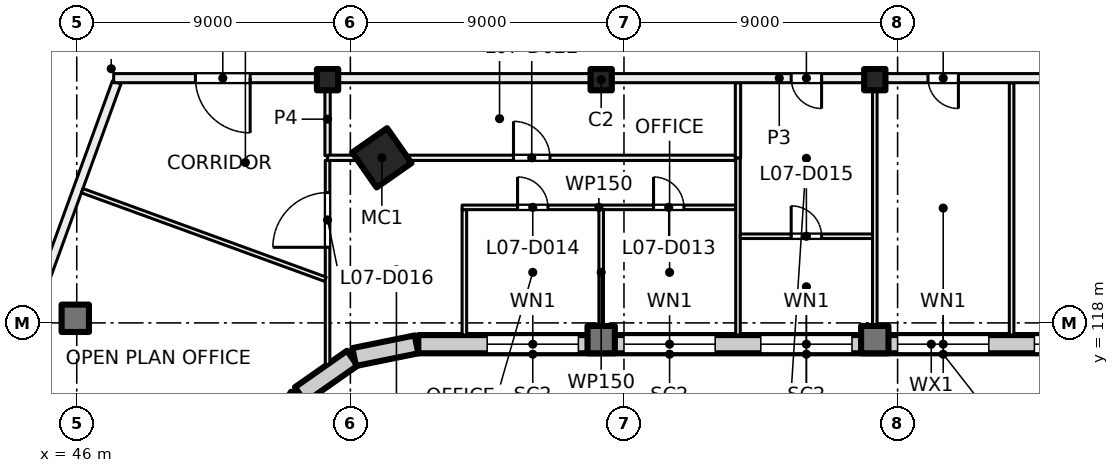
"""IFC4 building model, lengths in metres.
Left out: names, types, materials, properties, quantities, classifications, styles, units other than length and angle.
Written with IfcOpenShell. Run it as: python <this file> out.ifc"""

import sys

from ifc_helpers import new_model, si_unit, direction, frame, frame_2d, origin, origin_2d, place, context, subcontext, project, spatial, rectangle, hollow_rectangle, extrude, element, fill, save


model = new_model("IFC4")
c1 = context("Model", 3, precision=1e-05, world=origin(), true_north=direction((0.0, 1.0)))
c2 = subcontext(c1, "Body", "Model", "MODEL_VIEW")
j1 = project(units=[si_unit("LENGTHUNIT", "METRE"), si_unit("PLANEANGLEUNIT", "RADIAN")], contexts=[c1])
p1 = place(None, origin())
s1 = spatial("IfcSite", under=j1, at=p1, CompositionType="ELEMENT")
p2 = place(p1, origin())
s2 = spatial("IfcBuilding", under=s1, at=p2, CompositionType="ELEMENT")
p3 = place(p2, frame((0.0, 0.0, 35.5)))
s3 = spatial("IfcBuildingStorey", under=s2, at=p3, CompositionType="ELEMENT", Elevation=35.5)
p4 = place(p3, frame((56.036, 123.43, 0.0), z_axis=(0.0, 0.0, 1.0), x_axis=(0.573576436351, -0.819152044289, 0.0)))
e1 = element("IfcColumn", 1, at=p4, inside=s3, PredefinedType="COLUMN", context=c2, shape_type="SweptSolid", body=[
    extrude(hollow_rectangle(XDim=1.4, YDim=1.4, WallThickness=0.04, at=origin_2d()), origin(), (0.0, 0.0, 1.0), 4.0),
])
for number, where, z_axis, x_axis in (
    (2, (54.25, 126.0, 0.0), (0.0, 0.0, 1.0), (1.0, 0.0, 0.0)),
    (3, (63.25, 126.0, 0.0), (0.0, 0.0, 1.0), (1.0, 0.0, 0.0)),
    (4, (72.25, 126.0, 0.0), (0.0, 0.0, 1.0), (1.0, 0.0, 0.0)),
):
    element("IfcColumn", number, at=place(p3, frame(where, z_axis=z_axis, x_axis=x_axis)), inside=s3, PredefinedType="COLUMN", context=c2, shape_type="SweptSolid", body=[
        extrude(rectangle(XDim=0.7, YDim=0.7, at=origin_2d()), origin(), (0.0, 0.0, 1.0), 4.0),
    ])
for number, where, z_axis, x_axis in (
    (5, (45.952, 118.152, 0.0), (0.0, 0.0, 1.0), (1.0, 0.0, 0.0)),
    (6, (63.25, 117.45, 0.0), (0.0, 0.0, 1.0), (1.0, 0.0, 0.0)),
    (7, (72.25, 117.45, 0.0), (0.0, 0.0, 1.0), (1.0, 0.0, 0.0)),
):
    element("IfcColumn", number, at=place(p3, frame(where, z_axis=z_axis, x_axis=x_axis)), inside=s3, PredefinedType="COLUMN", context=c2, shape_type="SweptSolid", body=[
        extrude(rectangle(XDim=0.9, YDim=0.9, at=origin_2d()), origin(), (0.0, 0.0, 1.0), 4.0),
    ])
p5 = place(p3, frame((53.305, 115.578, 0.0), z_axis=(0.0, 0.0, 1.0), x_axis=(-0.522402266438, -0.852699168535, 0.0)))
e8 = element("IfcWall", 8, at=p5, inside=s3, PredefinedType="SOLIDWALL", context=c2, shape_type="SweptSolid", body=[
    extrude(rectangle(XDim=2.042, YDim=0.6, at=frame_2d((1.021, 0.0))), origin(), (0.0, 0.0, 1.0), 3.625),
])
for number, where, z_axis, x_axis in (
    (9, (55.062, 116.839, 0.0), (0.0, 0.0, 1.0), (-0.819, -0.574, 0.0)),
    (10, (57.175, 117.294, 0.0), (0.0, 0.0, 1.0), (-0.98, -0.199, 0.0)),
):
    element("IfcWall", number, at=place(p3, frame(where, z_axis=z_axis, x_axis=x_axis)), inside=s3, PredefinedType="SOLIDWALL", context=c2, shape_type="SweptSolid", body=[
        extrude(rectangle(XDim=2.092, YDim=0.6, at=frame_2d((1.046, 0.0))), origin(), (0.0, 0.0, 1.0), 3.625),
    ])
p6 = place(p3, frame((90.98, 117.3, 0.0), z_axis=(0.0, 0.0, 1.0), x_axis=(-1.0, 0.0, 0.0)))
e11 = element("IfcWall", 11, at=p6, inside=s3, PredefinedType="SOLIDWALL", context=c2, shape_type="SweptSolid", body=[
    extrude(rectangle(XDim=33.745, YDim=0.6, at=frame_2d((16.873, 0.0))), origin(), (0.0, 0.0, 1.0), 3.625),
])
p7 = place(p6, frame((1.48, 0.0, 0.9)))
e12 = element("IfcOpeningElement", 12, at=p7, cuts=e11, PredefinedType="OPENING", context=c2, shape_type="SweptSolid", body=[
    extrude(rectangle(XDim=3.0, YDim=2.4, at=frame_2d((1.5, 1.2))), frame((0.0, 0.31, 0.0), z_axis=(0.0, -1.0, 0.0), x_axis=(1.0, 0.0, 0.0)), (0.0, 0.0, 1.0), 0.62),
])
p8 = place(p6, frame((5.98, 0.0, 0.9)))
e13 = element("IfcOpeningElement", 13, at=p8, cuts=e11, PredefinedType="OPENING", context=c2, shape_type="SweptSolid", body=[
    extrude(rectangle(XDim=3.0, YDim=2.4, at=frame_2d((1.5, 1.2))), frame((0.0, 0.31, 0.0), z_axis=(0.0, -1.0, 0.0), x_axis=(1.0, 0.0, 0.0)), (0.0, 0.0, 1.0), 0.62),
])
p9 = place(p6, frame((10.48, 0.0, 0.9)))
e14 = element("IfcOpeningElement", 14, at=p9, cuts=e11, PredefinedType="OPENING", context=c2, shape_type="SweptSolid", body=[
    extrude(rectangle(XDim=3.0, YDim=2.4, at=frame_2d((1.5, 1.2))), frame((0.0, 0.31, 0.0), z_axis=(0.0, -1.0, 0.0), x_axis=(1.0, 0.0, 0.0)), (0.0, 0.0, 1.0), 0.62),
])
p10 = place(p6, frame((14.98, 0.0, 0.9)))
e15 = element("IfcOpeningElement", 15, at=p10, cuts=e11, PredefinedType="OPENING", context=c2, shape_type="SweptSolid", body=[
    extrude(rectangle(XDim=3.0, YDim=2.4, at=frame_2d((1.5, 1.2))), frame((0.0, 0.31, 0.0), z_axis=(0.0, -1.0, 0.0), x_axis=(1.0, 0.0, 0.0)), (0.0, 0.0, 1.0), 0.62),
])
p11 = place(p6, frame((19.48, 0.0, 0.9)))
e16 = element("IfcOpeningElement", 16, at=p11, cuts=e11, PredefinedType="OPENING", context=c2, shape_type="SweptSolid", body=[
    extrude(rectangle(XDim=3.0, YDim=2.4, at=frame_2d((1.5, 1.2))), frame((0.0, 0.31, 0.0), z_axis=(0.0, -1.0, 0.0), x_axis=(1.0, 0.0, 0.0)), (0.0, 0.0, 1.0), 0.62),
])
p12 = place(p6, frame((23.98, 0.0, 0.9)))
e17 = element("IfcOpeningElement", 17, at=p12, cuts=e11, PredefinedType="OPENING", context=c2, shape_type="SweptSolid", body=[
    extrude(rectangle(XDim=3.0, YDim=2.4, at=frame_2d((1.5, 1.2))), frame((0.0, 0.31, 0.0), z_axis=(0.0, -1.0, 0.0), x_axis=(1.0, 0.0, 0.0)), (0.0, 0.0, 1.0), 0.62),
])
p13 = place(p6, frame((28.48, 0.0, 0.9)))
e18 = element("IfcOpeningElement", 18, at=p13, cuts=e11, PredefinedType="OPENING", context=c2, shape_type="SweptSolid", body=[
    extrude(rectangle(XDim=3.0, YDim=2.4, at=frame_2d((1.5, 1.2))), frame((0.0, 0.31, 0.0), z_axis=(0.0, -1.0, 0.0), x_axis=(1.0, 0.0, 0.0)), (0.0, 0.0, 1.0), 0.62),
])
p14 = place(p3, frame((47.314, 125.909, 0.0), z_axis=(0.0, 0.0, 1.0), x_axis=(-0.342010770371, -0.939696032209, 0.0)))
e19 = element("IfcWall", 19, at=p14, inside=s3, PredefinedType="PARTITIONING", context=c2, shape_type="SweptSolid", body=[
    extrude(rectangle(XDim=31.485, YDim=0.3, at=frame_2d((15.742, 0.0))), origin(), (0.0, 0.0, 1.0), 3.625),
])
p15 = place(p14, frame((16.709, 0.0, 0.0)))
e20 = element("IfcOpeningElement", 20, at=p15, cuts=e19, PredefinedType="OPENING", context=c2, shape_type="SweptSolid", body=[
    extrude(rectangle(XDim=1.8, YDim=2.1, at=frame_2d((0.9, 1.05))), frame((0.0, 0.16, 0.0), z_axis=(0.0, -1.0, 0.0), x_axis=(1.0, 0.0, 0.0)), (0.0, 0.0, 1.0), 0.32),
])
p16 = place(p3, frame((54.25, 116.637, 0.0), z_axis=(0.0, 0.0, 1.0), x_axis=(0.0, 1.0, 0.0)))
e21 = element("IfcWall", 21, at=p16, inside=s3, PredefinedType="PARTITIONING", context=c2, shape_type="SweptSolid", body=[
    extrude(rectangle(XDim=6.709, YDim=0.15, at=frame_2d((3.354, 0.0))), origin(), (0.0, 0.0, 1.0), 3.625),
])
p17 = place(p16, frame((3.85, 0.0, 0.0)))
e22 = element("IfcOpeningElement", 22, at=p17, cuts=e21, PredefinedType="OPENING", context=c2, shape_type="SweptSolid", body=[
    extrude(rectangle(XDim=1.8, YDim=2.1, at=frame_2d((0.9, 1.05))), frame((0.0, 0.085, 0.0), z_axis=(0.0, -1.0, 0.0), x_axis=(1.0, 0.0, 0.0)), (0.0, 0.0, 1.0), 0.17),
])
p18 = place(p3, frame((54.18, 119.436, 0.0), z_axis=(0.0, 0.0, 1.0), x_axis=(-0.939669476286, 0.342083725624, 0.0)))
e23 = element("IfcWall", 23, at=p18, inside=s3, PredefinedType="PARTITIONING", context=c2, shape_type="SweptSolid", body=[
    extrude(rectangle(XDim=8.516, YDim=0.15, at=frame_2d((4.258, 0.0))), origin(), (0.0, 0.0, 1.0), 3.625),
])
p19 = place(p3, frame((54.25, 123.502, 0.0), z_axis=(0.0, 0.0, 1.0), x_axis=(0.0, 1.0, 0.0)))
e24 = element("IfcWall", 24, at=p19, inside=s3, PredefinedType="PARTITIONING", context=c2, shape_type="SweptSolid", body=[
    extrude(rectangle(XDim=2.398, YDim=0.175, at=frame_2d((1.199, 0.0))), origin(), (0.0, 0.0, 1.0), 3.625),
])
p20 = place(p3, frame((54.25, 123.43, 0.0), z_axis=(0.0, 0.0, 1.0), x_axis=(1.0, 0.0, 0.0)))
e25 = element("IfcWall", 25, at=p20, inside=s3, PredefinedType="PARTITIONING", context=c2, shape_type="SweptSolid", body=[
    extrude(rectangle(XDim=13.412, YDim=0.175, at=frame_2d((6.706, 0.0))), origin(), (0.0, 0.0, 1.0), 3.625),
])
p21 = place(p20, frame((6.116, 0.0, 0.0)))
e26 = element("IfcOpeningElement", 26, at=p21, cuts=e25, PredefinedType="OPENING", context=c2, shape_type="SweptSolid", body=[
    extrude(rectangle(XDim=1.2, YDim=2.1, at=frame_2d((0.6, 1.05))), frame((0.0, 0.097, 0.0), z_axis=(0.0, -1.0, 0.0), x_axis=(1.0, 0.0, 0.0)), (0.0, 0.0, 1.0), 0.195),
])
p22 = place(p3, frame((58.75, 117.6, 0.0), z_axis=(0.0, 0.0, 1.0), x_axis=(0.0, 1.0, 0.0)))
e27 = element("IfcWall", 27, at=p22, inside=s3, PredefinedType="PARTITIONING", context=c2, shape_type="SweptSolid", body=[
    extrude(rectangle(XDim=4.125, YDim=0.15, at=frame_2d((2.062, 0.0))), origin(), (0.0, 0.0, 1.0), 3.625),
])
p23 = place(p3, frame((58.675, 121.8, 0.0), z_axis=(0.0, 0.0, 1.0), x_axis=(1.0, 0.0, 0.0)))
e28 = element("IfcWall", 28, at=p23, inside=s3, PredefinedType="PARTITIONING", context=c2, shape_type="SweptSolid", body=[
    extrude(rectangle(XDim=9.0, YDim=0.15, at=frame_2d((4.5, 0.0))), origin(), (0.0, 0.0, 1.0), 3.625),
])
p24 = place(p23, frame((6.298, 0.0, 0.0)))
e29 = element("IfcOpeningElement", 29, at=p24, cuts=e28, PredefinedType="OPENING", context=c2, shape_type="SweptSolid", body=[
    extrude(rectangle(XDim=1.0, YDim=2.1, at=frame_2d((0.5, 1.05))), frame((0.0, 0.085, 0.0), z_axis=(0.0, -1.0, 0.0), x_axis=(1.0, 0.0, 0.0)), (0.0, 0.0, 1.0), 0.17),
])
p25 = place(p23, frame((1.825, 0.0, 0.0)))
e30 = element("IfcOpeningElement", 30, at=p25, cuts=e28, PredefinedType="OPENING", context=c2, shape_type="SweptSolid", body=[
    extrude(rectangle(XDim=1.0, YDim=2.1, at=frame_2d((0.5, 1.05))), frame((0.0, 0.085, 0.0), z_axis=(0.0, -1.0, 0.0), x_axis=(1.0, 0.0, 0.0)), (0.0, 0.0, 1.0), 0.17),
])
p26 = place(p3, frame((63.25, 117.6, 0.0), z_axis=(0.0, 0.0, 1.0), x_axis=(0.0, 1.0, 0.0)))
e31 = element("IfcWall", 31, at=p26, inside=s3, PredefinedType="PARTITIONING", context=c2, shape_type="SweptSolid", body=[
    extrude(rectangle(XDim=4.125, YDim=0.15, at=frame_2d((2.062, 0.0))), origin(), (0.0, 0.0, 1.0), 3.625),
])
p27 = place(p3, frame((67.75, 117.6, 0.0), z_axis=(0.0, 0.0, 1.0), x_axis=(0.0, 1.0, 0.0)))
e32 = element("IfcWall", 32, at=p27, inside=s3, PredefinedType="PARTITIONING", context=c2, shape_type="SweptSolid", body=[
    extrude(rectangle(XDim=5.83, YDim=0.15, at=frame_2d((2.915, 0.0))), origin(), (0.0, 0.0, 1.0), 3.625),
])
p28 = place(p3, frame((67.825, 120.85, 0.0), z_axis=(0.0, 0.0, 1.0), x_axis=(1.0, 0.0, 0.0)))
e33 = element("IfcWall", 33, at=p28, inside=s3, PredefinedType="PARTITIONING", context=c2, shape_type="SweptSolid", body=[
    extrude(rectangle(XDim=4.35, YDim=0.15, at=frame_2d((2.175, 0.0))), origin(), (0.0, 0.0, 1.0), 3.625),
])
p29 = place(p28, frame((1.675, 0.0, 0.0)))
e34 = element("IfcOpeningElement", 34, at=p29, cuts=e33, PredefinedType="OPENING", context=c2, shape_type="SweptSolid", body=[
    extrude(rectangle(XDim=1.0, YDim=2.1, at=frame_2d((0.5, 1.05))), frame((0.0, 0.085, 0.0), z_axis=(0.0, -1.0, 0.0), x_axis=(1.0, 0.0, 0.0)), (0.0, 0.0, 1.0), 0.17),
])
p30 = place(p3, frame((67.75, 123.43, 0.0), z_axis=(0.0, 0.0, 1.0), x_axis=(0.0, 1.0, 0.0)))
e35 = element("IfcWall", 35, at=p30, inside=s3, PredefinedType="PARTITIONING", context=c2, shape_type="SweptSolid", body=[
    extrude(rectangle(XDim=2.47, YDim=0.175, at=frame_2d((1.235, 0.0))), origin(), (0.0, 0.0, 1.0), 3.625),
])
for number, where, z_axis, x_axis in (
    (36, (72.25, 117.6, 0.0), (0.0, 0.0, 1.0), (0.0, 1.0, 0.0)),
    (37, (76.75, 117.6, 0.0), (0.0, 0.0, 1.0), (0.0, 1.0, 0.0)),
):
    element("IfcWall", number, at=place(p3, frame(where, z_axis=z_axis, x_axis=x_axis)), inside=s3, PredefinedType="PARTITIONING", context=c2, shape_type="SweptSolid", body=[
        extrude(rectangle(XDim=8.3, YDim=0.15, at=frame_2d((4.15, 0.0))), origin(), (0.0, 0.0, 1.0), 3.625),
    ])
p31 = place(p3, frame((91.0, 126.05, 0.0), z_axis=(0.0, 0.0, 1.0), x_axis=(-1.0, 0.0, 0.0)))
e38 = element("IfcWall", 38, at=p31, inside=s3, PredefinedType="PARTITIONING", context=c2, shape_type="SweptSolid", body=[
    extrude(rectangle(XDim=43.785, YDim=0.3, at=frame_2d((21.893, 0.0))), origin(), (0.0, 0.0, 1.0), 3.625),
])
p32 = place(p31, frame((2.025, 0.0, 0.0)))
e39 = element("IfcOpeningElement", 39, at=p32, cuts=e38, PredefinedType="OPENING", context=c2, shape_type="SweptSolid", body=[
    extrude(rectangle(XDim=1.2, YDim=2.1, at=frame_2d((0.6, 1.05))), frame((0.0, 0.16, 0.0), z_axis=(0.0, -1.0, 0.0), x_axis=(1.0, 0.0, 0.0)), (0.0, 0.0, 1.0), 0.32),
])
p33 = place(p31, frame((7.0, 0.0, 0.0)))
e40 = element("IfcOpeningElement", 40, at=p33, cuts=e38, PredefinedType="OPENING", context=c2, shape_type="SweptSolid", body=[
    extrude(rectangle(XDim=1.0, YDim=2.1, at=frame_2d((0.5, 1.05))), frame((0.0, 0.16, 0.0), z_axis=(0.0, -1.0, 0.0), x_axis=(1.0, 0.0, 0.0)), (0.0, 0.0, 1.0), 0.32),
])
p34 = place(p31, frame((11.5, 0.0, 0.0)))
e41 = element("IfcOpeningElement", 41, at=p34, cuts=e38, PredefinedType="OPENING", context=c2, shape_type="SweptSolid", body=[
    extrude(rectangle(XDim=1.0, YDim=2.1, at=frame_2d((0.5, 1.05))), frame((0.0, 0.16, 0.0), z_axis=(0.0, -1.0, 0.0), x_axis=(1.0, 0.0, 0.0)), (0.0, 0.0, 1.0), 0.32),
])
p35 = place(p31, frame((16.0, 0.0, 0.0)))
e42 = element("IfcOpeningElement", 42, at=p35, cuts=e38, PredefinedType="OPENING", context=c2, shape_type="SweptSolid", body=[
    extrude(rectangle(XDim=1.0, YDim=2.1, at=frame_2d((0.5, 1.05))), frame((0.0, 0.16, 0.0), z_axis=(0.0, -1.0, 0.0), x_axis=(1.0, 0.0, 0.0)), (0.0, 0.0, 1.0), 0.32),
])
p36 = place(p31, frame((20.5, 0.0, 0.0)))
e43 = element("IfcOpeningElement", 43, at=p36, cuts=e38, PredefinedType="OPENING", context=c2, shape_type="SweptSolid", body=[
    extrude(rectangle(XDim=1.0, YDim=2.1, at=frame_2d((0.5, 1.05))), frame((0.0, 0.16, 0.0), z_axis=(0.0, -1.0, 0.0), x_axis=(1.0, 0.0, 0.0)), (0.0, 0.0, 1.0), 0.32),
])
p37 = place(p31, frame((39.296, 0.0, 0.0)))
e44 = element("IfcOpeningElement", 44, at=p37, cuts=e38, PredefinedType="OPENING", context=c2, shape_type="SweptSolid", body=[
    extrude(rectangle(XDim=1.8, YDim=2.1, at=frame_2d((0.9, 1.05))), frame((0.0, 0.16, 0.0), z_axis=(0.0, -1.0, 0.0), x_axis=(1.0, 0.0, 0.0)), (0.0, 0.0, 1.0), 0.32),
])
p38 = place(p9, origin())
e45 = element("IfcWindow", 45, at=p38, inside=s3, PartitioningType="SINGLE_PANEL", PredefinedType="WINDOW", context=c2, shape_type="SweptSolid", body=[
    extrude(rectangle(XDim=3.0, YDim=2.4, at=frame_2d((1.5, 1.2))), frame((0.0, 0.03, 0.0), z_axis=(0.0, -1.0, 0.0), x_axis=(1.0, 0.0, 0.0)), (0.0, 0.0, 1.0), 0.06),
])
fill(e14, e45)
p39 = place(p10, origin())
e46 = element("IfcWindow", 46, at=p39, inside=s3, PartitioningType="SINGLE_PANEL", PredefinedType="WINDOW", context=c2, shape_type="SweptSolid", body=[
    extrude(rectangle(XDim=3.0, YDim=2.4, at=frame_2d((1.5, 1.2))), frame((0.0, 0.03, 0.0), z_axis=(0.0, -1.0, 0.0), x_axis=(1.0, 0.0, 0.0)), (0.0, 0.0, 1.0), 0.06),
])
fill(e15, e46)
p40 = place(p11, origin())
e47 = element("IfcWindow", 47, at=p40, inside=s3, PartitioningType="SINGLE_PANEL", PredefinedType="WINDOW", context=c2, shape_type="SweptSolid", body=[
    extrude(rectangle(XDim=3.0, YDim=2.4, at=frame_2d((1.5, 1.2))), frame((0.0, 0.03, 0.0), z_axis=(0.0, -1.0, 0.0), x_axis=(1.0, 0.0, 0.0)), (0.0, 0.0, 1.0), 0.06),
])
fill(e16, e47)
p41 = place(p12, origin())
e48 = element("IfcWindow", 48, at=p41, inside=s3, PartitioningType="SINGLE_PANEL", PredefinedType="WINDOW", context=c2, shape_type="SweptSolid", body=[
    extrude(rectangle(XDim=3.0, YDim=2.4, at=frame_2d((1.5, 1.2))), frame((0.0, 0.03, 0.0), z_axis=(0.0, -1.0, 0.0), x_axis=(1.0, 0.0, 0.0)), (0.0, 0.0, 1.0), 0.06),
])
fill(e17, e48)
p42 = place(p13, origin())
e49 = element("IfcWindow", 49, at=p42, inside=s3, PartitioningType="SINGLE_PANEL", PredefinedType="WINDOW", context=c2, shape_type="SweptSolid", body=[
    extrude(rectangle(XDim=3.0, YDim=2.4, at=frame_2d((1.5, 1.2))), frame((0.0, 0.03, 0.0), z_axis=(0.0, -1.0, 0.0), x_axis=(1.0, 0.0, 0.0)), (0.0, 0.0, 1.0), 0.06),
])
fill(e18, e49)
p43 = place(p35, origin())
e50 = element("IfcDoor", 50, at=p43, inside=s3, OperationType="SINGLE_SWING_LEFT", PredefinedType="DOOR", context=c2, shape_type="SweptSolid", body=[
    extrude(rectangle(XDim=1.0, YDim=2.1, at=frame_2d((0.5, 1.05))), frame((0.0, 0.025, 0.0), z_axis=(0.0, -1.0, 0.0), x_axis=(1.0, 0.0, 0.0)), (0.0, 0.0, 1.0), 0.05),
])
fill(e42, e50)
p44 = place(p36, origin())
e51 = element("IfcDoor", 51, at=p44, inside=s3, OperationType="SINGLE_SWING_LEFT", PredefinedType="DOOR", context=c2, shape_type="SweptSolid", body=[
    extrude(rectangle(XDim=1.0, YDim=2.1, at=frame_2d((0.5, 1.05))), frame((0.0, 0.025, 0.0), z_axis=(0.0, -1.0, 0.0), x_axis=(1.0, 0.0, 0.0)), (0.0, 0.0, 1.0), 0.05),
])
fill(e43, e51)
p45 = place(p24, origin())
e52 = element("IfcDoor", 52, at=p45, inside=s3, OperationType="SINGLE_SWING_RIGHT", PredefinedType="DOOR", context=c2, shape_type="SweptSolid", body=[
    extrude(rectangle(XDim=1.0, YDim=2.1, at=frame_2d((0.5, 1.05))), frame((0.0, 0.025, 0.0), z_axis=(0.0, -1.0, 0.0), x_axis=(1.0, 0.0, 0.0)), (0.0, 0.0, 1.0), 0.05),
])
fill(e29, e52)
p46 = place(p25, origin())
e53 = element("IfcDoor", 53, at=p46, inside=s3, OperationType="SINGLE_SWING_LEFT", PredefinedType="DOOR", context=c2, shape_type="SweptSolid", body=[
    extrude(rectangle(XDim=1.0, YDim=2.1, at=frame_2d((0.5, 1.05))), frame((0.0, 0.025, 0.0), z_axis=(0.0, -1.0, 0.0), x_axis=(1.0, 0.0, 0.0)), (0.0, 0.0, 1.0), 0.05),
])
fill(e30, e53)
p47 = place(p29, origin())
e54 = element("IfcDoor", 54, at=p47, inside=s3, OperationType="SINGLE_SWING_LEFT", PredefinedType="DOOR", context=c2, shape_type="SweptSolid", body=[
    extrude(rectangle(XDim=1.0, YDim=2.1, at=frame_2d((0.5, 1.05))), frame((0.0, 0.025, 0.0), z_axis=(0.0, -1.0, 0.0), x_axis=(1.0, 0.0, 0.0)), (0.0, 0.0, 1.0), 0.05),
])
fill(e34, e54)
p48 = place(p17, origin())
e55 = element("IfcDoor", 55, at=p48, inside=s3, OperationType="DOUBLE_DOOR_SINGLE_SWING", PredefinedType="DOOR", context=c2, shape_type="SweptSolid", body=[
    extrude(rectangle(XDim=1.8, YDim=2.1, at=frame_2d((0.9, 1.05))), frame((0.0, 0.025, 0.0), z_axis=(0.0, -1.0, 0.0), x_axis=(1.0, 0.0, 0.0)), (0.0, 0.0, 1.0), 0.05),
])
fill(e22, e55)
p49 = place(p37, origin())
e56 = element("IfcDoor", 56, at=p49, inside=s3, OperationType="DOUBLE_DOOR_SINGLE_SWING", PredefinedType="DOOR", context=c2, shape_type="SweptSolid", body=[
    extrude(rectangle(XDim=1.8, YDim=2.1, at=frame_2d((0.9, 1.05))), frame((0.0, 0.025, 0.0), z_axis=(0.0, -1.0, 0.0), x_axis=(1.0, 0.0, 0.0)), (0.0, 0.0, 1.0), 0.05),
])
fill(e44, e56)
p50 = place(p21, origin())
e57 = element("IfcDoor", 57, at=p50, inside=s3, OperationType="DOUBLE_DOOR_SINGLE_SWING", PredefinedType="DOOR", context=c2, shape_type="SweptSolid", body=[
    extrude(rectangle(XDim=1.2, YDim=2.1, at=frame_2d((0.6, 1.05))), frame((0.0, 0.025, 0.0), z_axis=(0.0, -1.0, 0.0), x_axis=(1.0, 0.0, 0.0)), (0.0, 0.0, 1.0), 0.05),
])
fill(e26, e57)
save(model, sys.argv[1])
